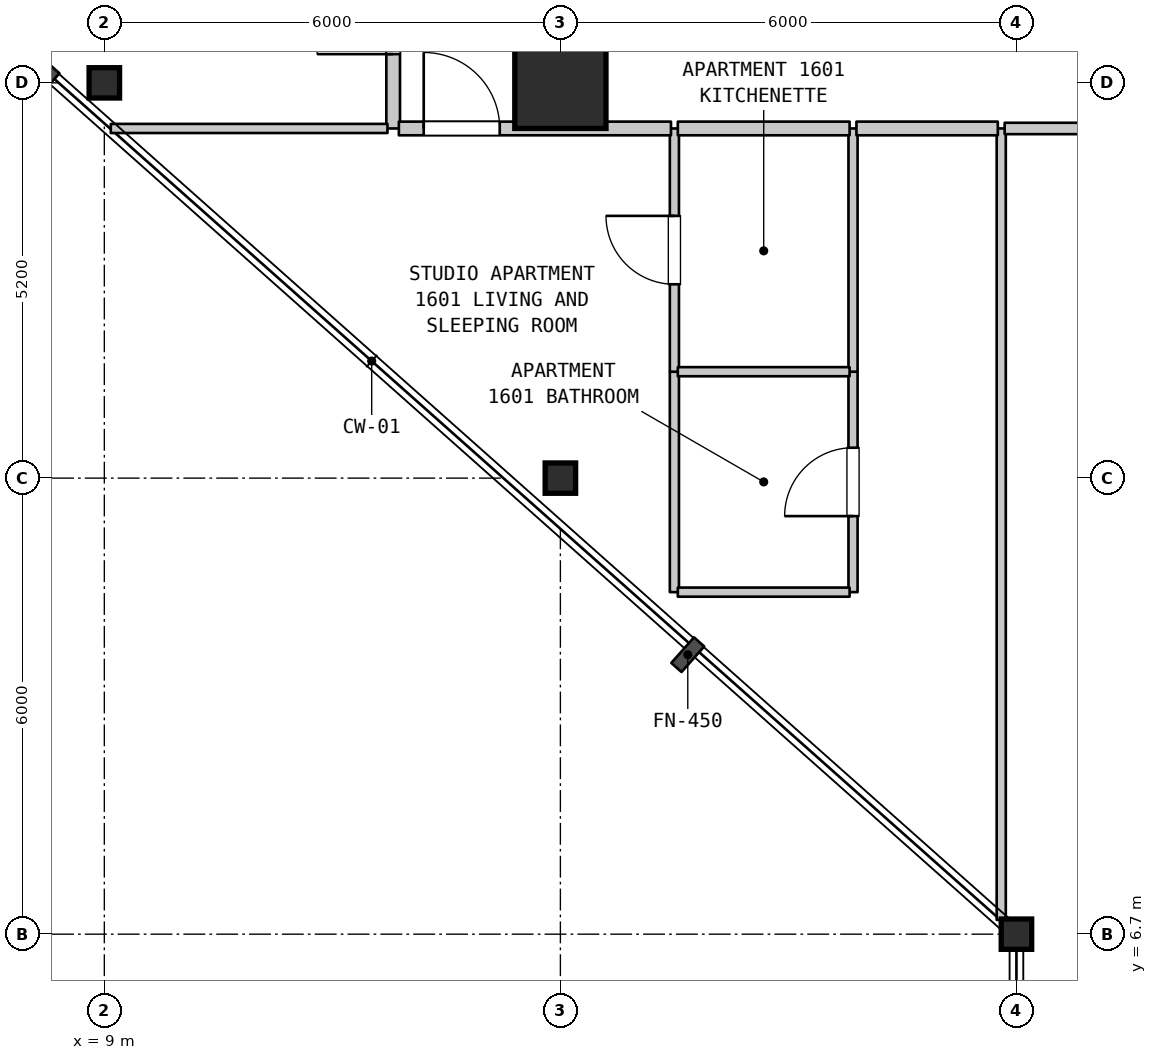
"""IFC4 building model, lengths in metres.
Left out: names, types, materials, properties, quantities, classifications, styles, units other than length and angle.
Written with IfcOpenShell. Run it as: python <this file> out.ifc"""

import sys

from ifc_helpers import new_model, si_unit, direction, frame, frame_2d, origin, origin_2d, place, context, subcontext, project, spatial, rectangle, i_section, extrude, element, fill, save


model = new_model("IFC4")
c1 = context("Model", 3, precision=1e-05, world=origin(), true_north=direction((0.0, 1.0)))
c2 = subcontext(c1, "Body", "Model", "MODEL_VIEW")
j1 = project(units=[si_unit("LENGTHUNIT", "METRE"), si_unit("PLANEANGLEUNIT", "RADIAN")], contexts=[c1])
p1 = place(None, origin())
s1 = spatial("IfcSite", under=j1, at=p1, CompositionType="ELEMENT")
p2 = place(p1, origin())
s2 = spatial("IfcBuilding", under=s1, at=p2, CompositionType="ELEMENT")
p3 = place(p2, frame((0.0, 0.0, 70.1)))
s3 = spatial("IfcBuildingStorey", under=s2, at=p3, CompositionType="ELEMENT", Elevation=70.1)
for number, where, z_axis, x_axis in (
    (1, (9.0, 17.9, 0.0), (0.0, 0.0, 1.0), (1.0, 0.0, 0.0)),
    (2, (15.0, 12.7, 0.0), (0.0, 0.0, 1.0), (1.0, 0.0, 0.0)),
):
    element("IfcColumn", number, at=place(p3, frame(where, z_axis=z_axis, x_axis=x_axis)), inside=s3, PredefinedType="COLUMN", context=c2, shape_type="SweptSolid", body=[
        extrude(i_section(OverallWidth=0.401, OverallDepth=0.399, WebThickness=0.025, FlangeThickness=0.04, FilletRadius=0.015, at=origin_2d()), origin(), (0.0, 0.0, 1.0), 3.7),
    ])
p4 = place(p3, frame((15.0, 17.9, 0.0), z_axis=(0.0, 0.0, 1.0), x_axis=(1.0, 0.0, 0.0)))
e3 = element("IfcColumn", 3, at=p4, inside=s3, PredefinedType="COLUMN", context=c2, shape_type="SweptSolid", body=[
    extrude(rectangle(XDim=1.2, YDim=1.2, at=origin_2d()), origin(), (0.0, 0.0, 1.0), 3.7),
])
p5 = place(p3, frame((21.0, 6.7, 0.0), z_axis=(0.0, 0.0, 1.0), x_axis=(1.0, 0.0, 0.0)))
e4 = element("IfcColumn", 4, at=p5, inside=s3, PredefinedType="COLUMN", context=c2, shape_type="SweptSolid", body=[
    extrude(i_section(OverallWidth=0.401, OverallDepth=0.399, WebThickness=0.025, FlangeThickness=0.04, FilletRadius=0.015, at=origin_2d()), origin(), (0.0, 0.0, 1.0), 3.7),
])
p6 = place(p3, frame((12.8, 17.3, 0.0), z_axis=(0.0, 0.0, 1.0), x_axis=(0.0, 1.0, 0.0)))
e5 = element("IfcWall", 5, at=p6, inside=s3, PredefinedType="STANDARD", context=c2, shape_type="SweptSolid", body=[
    extrude(rectangle(XDim=3.1, YDim=0.18, at=frame_2d((1.55, 0.0))), origin(), (0.0, 0.0, 1.0), 3.385),
])
p7 = place(p6, frame((0.978, 0.0, 0.0)))
e6 = element("IfcOpeningElement", 6, at=p7, cuts=e5, PredefinedType="OPENING", context=c2, shape_type="SweptSolid", body=[
    extrude(rectangle(XDim=1.0, YDim=2.15, at=frame_2d((0.5, 1.075))), frame((0.0, 0.1, 0.0), z_axis=(0.0, -1.0, 0.0), x_axis=(1.0, 0.0, 0.0)), (0.0, 0.0, 1.0), 0.2),
])
p8 = place(p3, frame((16.5, 11.2, 0.0), z_axis=(0.0, 0.0, 1.0), x_axis=(0.0, 1.0, 0.0)))
e7 = element("IfcWall", 7, at=p8, inside=s3, PredefinedType="PARTITIONING", context=c2, shape_type="SweptSolid", body=[
    extrude(rectangle(XDim=2.9, YDim=0.12, at=frame_2d((1.45, 0.0))), origin(), (0.0, 0.0, 1.0), 3.385),
])
p9 = place(p3, frame((16.5, 14.1, 0.0), z_axis=(0.0, 0.0, 1.0), x_axis=(0.0, 1.0, 0.0)))
e8 = element("IfcWall", 8, at=p9, inside=s3, PredefinedType="PARTITIONING", context=c2, shape_type="SweptSolid", body=[
    extrude(rectangle(XDim=3.2, YDim=0.12, at=frame_2d((1.6, 0.0))), origin(), (0.0, 0.0, 1.0), 3.385),
])
p10 = place(p9, frame((1.15, 0.0, 0.0)))
e9 = element("IfcOpeningElement", 9, at=p10, cuts=e8, PredefinedType="OPENING", context=c2, shape_type="SweptSolid", body=[
    extrude(rectangle(XDim=0.9, YDim=2.15, at=frame_2d((0.45, 1.075))), frame((0.0, 0.07, 0.0), z_axis=(0.0, -1.0, 0.0), x_axis=(1.0, 0.0, 0.0)), (0.0, 0.0, 1.0), 0.14),
])
p11 = place(p3, frame((18.85, 11.2, 0.0), z_axis=(0.0, 0.0, 1.0), x_axis=(0.0, 1.0, 0.0)))
e10 = element("IfcWall", 10, at=p11, inside=s3, PredefinedType="PARTITIONING", context=c2, shape_type="SweptSolid", body=[
    extrude(rectangle(XDim=2.9, YDim=0.12, at=frame_2d((1.45, 0.0))), origin(), (0.0, 0.0, 1.0), 3.385),
])
p12 = place(p11, frame((1.0, 0.0, 0.0)))
e11 = element("IfcOpeningElement", 11, at=p12, cuts=e10, PredefinedType="OPENING", context=c2, shape_type="SweptSolid", body=[
    extrude(rectangle(XDim=0.9, YDim=2.1, at=frame_2d((0.45, 1.05))), frame((0.0, 0.07, 0.0), z_axis=(0.0, -1.0, 0.0), x_axis=(1.0, 0.0, 0.0)), (0.0, 0.0, 1.0), 0.14),
])
p13 = place(p3, frame((18.85, 14.1, 0.0), z_axis=(0.0, 0.0, 1.0), x_axis=(0.0, 1.0, 0.0)))
e12 = element("IfcWall", 12, at=p13, inside=s3, PredefinedType="PARTITIONING", context=c2, shape_type="SweptSolid", body=[
    extrude(rectangle(XDim=3.2, YDim=0.12, at=frame_2d((1.6, 0.0))), origin(), (0.0, 0.0, 1.0), 3.385),
])
p14 = place(p3, frame((20.8, 6.888, 0.0), z_axis=(0.0, 0.0, 1.0), x_axis=(0.0, 1.0, 0.0)))
e13 = element("IfcWall", 13, at=p14, inside=s3, PredefinedType="PARTITIONING", context=c2, shape_type="SweptSolid", body=[
    extrude(rectangle(XDim=10.412, YDim=0.12, at=frame_2d((5.206, 0.0))), origin(), (0.0, 0.0, 1.0), 3.385),
])
for number, where, z_axis, x_axis in (
    (14, (16.545, 11.2, 0.0), (0.0, 0.0, 1.0), (1.0, 0.0, 0.0)),
    (15, (16.545, 14.1, 0.0), (0.0, 0.0, 1.0), (1.0, 0.0, 0.0)),
):
    element("IfcWall", number, at=place(p3, frame(where, z_axis=z_axis, x_axis=x_axis)), inside=s3, PredefinedType="PARTITIONING", context=c2, shape_type="SweptSolid", body=[
        extrude(rectangle(XDim=2.26, YDim=0.12, at=frame_2d((1.13, 0.0))), origin(), (0.0, 0.0, 1.0), 3.385),
    ])
p15 = place(p3, frame((9.085, 17.3, 0.0), z_axis=(0.0, 0.0, 1.0), x_axis=(1.0, 0.0, 0.0)))
e16 = element("IfcWall", 16, at=p15, inside=s3, PredefinedType="PARTITIONING", context=c2, shape_type="SweptSolid", body=[
    extrude(rectangle(XDim=3.64, YDim=0.12, at=frame_2d((1.82, 0.0))), origin(), (0.0, 0.0, 1.0), 3.385),
])
p16 = place(p3, frame((12.875, 17.3, 0.0), z_axis=(0.0, 0.0, 1.0), x_axis=(1.0, 0.0, 0.0)))
e17 = element("IfcWall", 17, at=p16, inside=s3, PredefinedType="STANDARD", context=c2, shape_type="SweptSolid", body=[
    extrude(rectangle(XDim=3.58, YDim=0.18, at=frame_2d((1.79, 0.0))), origin(), (0.0, 0.0, 1.0), 3.385),
])
p17 = place(p16, frame((0.327, 0.0, 0.0)))
e18 = element("IfcOpeningElement", 18, at=p17, cuts=e17, PredefinedType="OPENING", context=c2, shape_type="SweptSolid", body=[
    extrude(rectangle(XDim=1.0, YDim=2.15, at=frame_2d((0.5, 1.075))), frame((0.0, 0.1, 0.0), z_axis=(0.0, -1.0, 0.0), x_axis=(1.0, 0.0, 0.0)), (0.0, 0.0, 1.0), 0.2),
])
p18 = place(p3, frame((16.545, 17.3, 0.0), z_axis=(0.0, 0.0, 1.0), x_axis=(1.0, 0.0, 0.0)))
e19 = element("IfcWall", 19, at=p18, inside=s3, PredefinedType="STANDARD", context=c2, shape_type="SweptSolid", body=[
    extrude(rectangle(XDim=2.26, YDim=0.18, at=frame_2d((1.13, 0.0))), origin(), (0.0, 0.0, 1.0), 3.385),
])
p19 = place(p3, frame((18.895, 17.3, 0.0), z_axis=(0.0, 0.0, 1.0), x_axis=(1.0, 0.0, 0.0)))
e20 = element("IfcWall", 20, at=p19, inside=s3, PredefinedType="STANDARD", context=c2, shape_type="SweptSolid", body=[
    extrude(rectangle(XDim=1.86, YDim=0.18, at=frame_2d((0.93, 0.0))), origin(), (0.0, 0.0, 1.0), 3.385),
])
p20 = place(p3, frame((20.845, 17.3, 0.0), z_axis=(0.0, 0.0, 1.0), x_axis=(1.0, 0.0, 0.0)))
e21 = element("IfcWall", 21, at=p20, inside=s3, PredefinedType="STANDARD", context=c2, shape_type="SweptSolid", body=[
    extrude(rectangle(XDim=3.91, YDim=0.15, at=frame_2d((1.955, 0.0))), origin(), (0.0, 0.0, 1.0), 3.385),
])
p21 = place(p20, frame((1.455, 0.0, 0.0)))
e22 = element("IfcOpeningElement", 22, at=p21, cuts=e21, PredefinedType="OPENING", context=c2, shape_type="SweptSolid", body=[
    extrude(rectangle(XDim=1.0, YDim=2.15, at=frame_2d((0.5, 1.075))), frame((0.0, 0.085, 0.0), z_axis=(0.0, -1.0, 0.0), x_axis=(1.0, 0.0, 0.0)), (0.0, 0.0, 1.0), 0.17),
])
p22 = place(p7, origin())
e23 = element("IfcDoor", 23, at=p22, inside=s3, OperationType="SINGLE_SWING_LEFT", PredefinedType="DOOR", context=c2, shape_type="SweptSolid", body=[
    extrude(rectangle(XDim=1.0, YDim=2.15, at=frame_2d((0.5, 1.075))), frame((0.0, 0.025, 0.0), z_axis=(0.0, -1.0, 0.0), x_axis=(1.0, 0.0, 0.0)), (0.0, 0.0, 1.0), 0.05),
])
fill(e6, e23)
p23 = place(p10, origin())
e24 = element("IfcDoor", 24, at=p23, inside=s3, OperationType="SINGLE_SWING_RIGHT", PredefinedType="DOOR", context=c2, shape_type="SweptSolid", body=[
    extrude(rectangle(XDim=0.9, YDim=2.15, at=frame_2d((0.45, 1.075))), frame((0.0, 0.025, 0.0), z_axis=(0.0, -1.0, 0.0), x_axis=(1.0, 0.0, 0.0)), (0.0, 0.0, 1.0), 0.05),
])
fill(e9, e24)
p24 = place(p12, origin())
e25 = element("IfcDoor", 25, at=p24, inside=s3, OperationType="SINGLE_SWING_LEFT", PredefinedType="DOOR", context=c2, shape_type="SweptSolid", body=[
    extrude(rectangle(XDim=0.9, YDim=2.1, at=frame_2d((0.45, 1.05))), frame((0.0, 0.025, 0.0), z_axis=(0.0, -1.0, 0.0), x_axis=(1.0, 0.0, 0.0)), (0.0, 0.0, 1.0), 0.05),
])
fill(e11, e25)
p25 = place(p17, origin())
e26 = element("IfcDoor", 26, at=p25, inside=s3, OperationType="SINGLE_SWING_LEFT", PredefinedType="DOOR", context=c2, shape_type="SweptSolid", body=[
    extrude(rectangle(XDim=1.0, YDim=2.15, at=frame_2d((0.5, 1.075))), frame((0.0, 0.025, 0.0), z_axis=(0.0, -1.0, 0.0), x_axis=(1.0, 0.0, 0.0)), (0.0, 0.0, 1.0), 0.05),
])
fill(e18, e26)
save(model, sys.argv[1])
